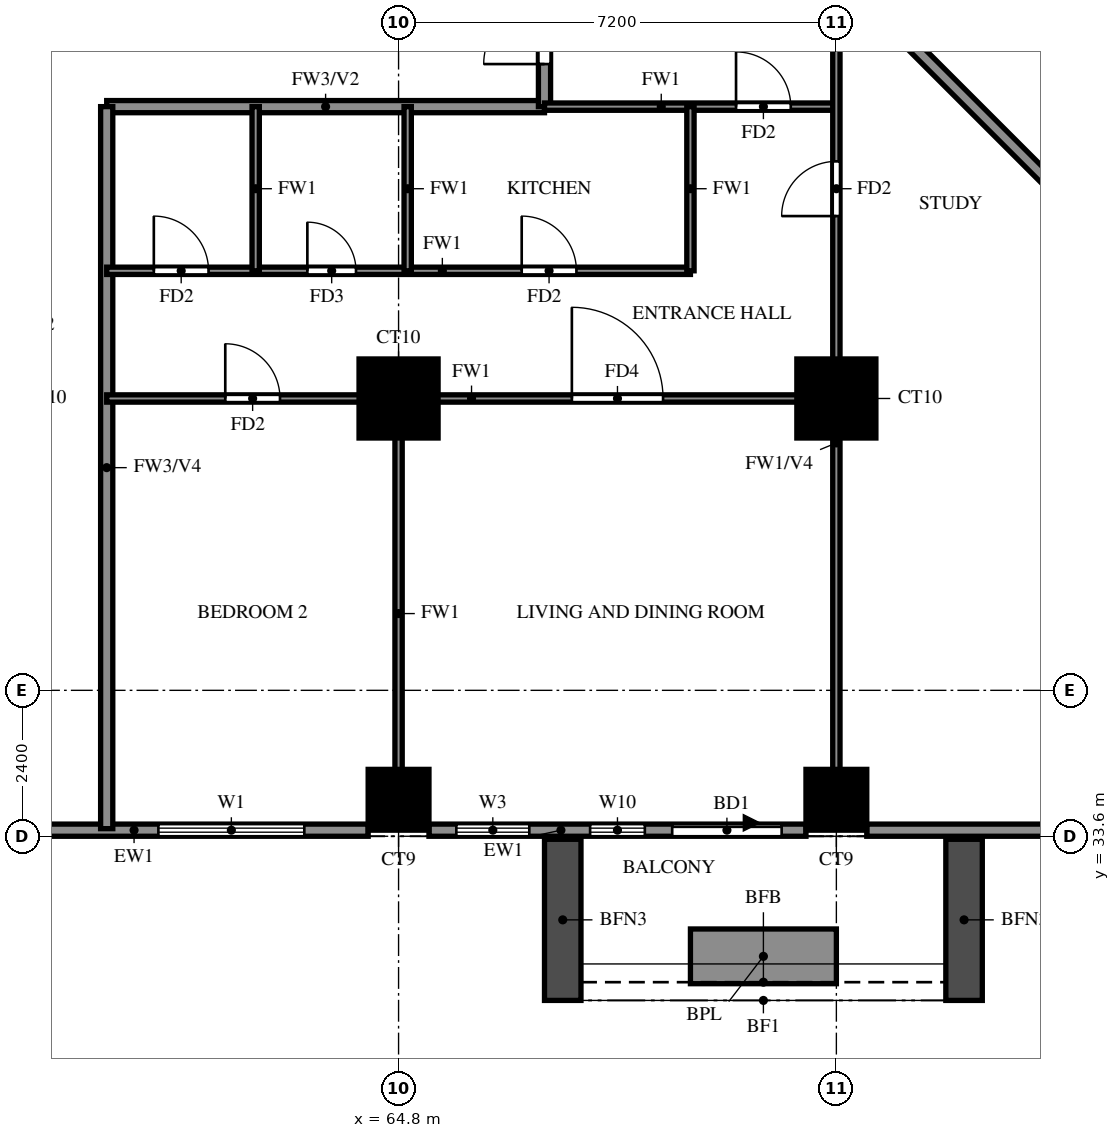
"""IFC4 building model, lengths in metres.
Left out: names, types, materials, properties, quantities, classifications, styles, units other than length and angle.
Written with IfcOpenShell. Run it as: python <this file> out.ifc"""

import sys

from ifc_helpers import new_model, si_unit, direction, frame, frame_2d, origin, origin_2d, place, context, subcontext, project, spatial, rectangle, extrude, source, transform, mapped, element, fill, save


model = new_model("IFC4")
c1 = context("Model", 3, precision=1e-05, world=origin(), true_north=direction((0.0, 1.0)))
c2 = subcontext(c1, "Body", "Model", "MODEL_VIEW")
j1 = project(units=[si_unit("LENGTHUNIT", "METRE"), si_unit("PLANEANGLEUNIT", "RADIAN")], contexts=[c1])
p1 = place(None, origin())
s1 = spatial("IfcSite", under=j1, at=p1, CompositionType="ELEMENT")
p2 = place(p1, origin())
s2 = spatial("IfcBuilding", under=s1, at=p2, CompositionType="ELEMENT")
p3 = place(p2, frame((0.0, 0.0, 69.0)))
s3 = spatial("IfcBuildingStorey", under=s2, at=p3, CompositionType="ELEMENT", Elevation=69.0)
m1 = source(origin(), c2, "Body", "SweptSolid", [
    extrude(rectangle(XDim=1.0, YDim=1.0, at=origin_2d()), origin(), (0.0, 0.0, 1.0), 3.18),
])
for number, where, z_axis, x_axis in (
    (1, (64.8, 34.2, 0.0), (0.0, 0.0, 1.0), (1.0, 0.0, 0.0)),
    (2, (72.0, 34.2, 0.0), (0.0, 0.0, 1.0), (1.0, 0.0, 0.0)),
):
    element("IfcColumn", number, at=place(p3, frame(where, z_axis=z_axis, x_axis=x_axis)), inside=s3, PredefinedType="COLUMN", context=c2, shape_type="MappedRepresentation", body=[
        mapped(m1, transform((0.0, 0.0, 0.0))),
    ])
m2 = source(origin(), c2, "Body", "SweptSolid", [
    extrude(rectangle(XDim=1.3, YDim=1.3, at=origin_2d()), origin(), (0.0, 0.0, 1.0), 3.18),
])
for number, where, z_axis, x_axis in (
    (3, (64.8, 40.8, 0.0), (0.0, 0.0, 1.0), (1.0, 0.0, 0.0)),
    (4, (72.0, 40.8, 0.0), (0.0, 0.0, 1.0), (1.0, 0.0, 0.0)),
):
    element("IfcColumn", number, at=place(p3, frame(where, z_axis=z_axis, x_axis=x_axis)), inside=s3, PredefinedType="COLUMN", context=c2, shape_type="MappedRepresentation", body=[
        mapped(m2, transform((0.0, 0.0, 0.0))),
    ])
p4 = place(p3, frame((85.996, 33.863, 0.0), z_axis=(0.0, 0.0, 1.0), x_axis=(-0.707100718496, 0.707112843825, 0.0)))
e5 = element("IfcWall", 5, at=p4, inside=s3, PredefinedType="SOLIDWALL", context=c2, shape_type="SweptSolid", body=[
    extrude(rectangle(XDim=20.135, YDim=0.2, at=frame_2d((10.067, 0.0))), origin(), (0.0, 0.0, 1.0), 3.18),
])
p5 = place(p3, frame((58.8, 33.7, 0.0), z_axis=(0.0, 0.0, 1.0), x_axis=(1.0, 0.0, 0.0)))
e6 = element("IfcWall", 6, at=p5, inside=s3, PredefinedType="SOLIDWALL", context=c2, shape_type="SweptSolid", body=[
    extrude(rectangle(XDim=5.5, YDim=0.2, at=frame_2d((2.75, 0.0))), origin(), (0.0, 0.0, 1.0), 3.18),
])
p6 = place(p5, frame((2.05, 0.0, 0.6)))
e7 = element("IfcOpeningElement", 7, at=p6, cuts=e6, PredefinedType="OPENING", context=c2, shape_type="SweptSolid", body=[
    extrude(rectangle(XDim=2.4, YDim=2.4, at=frame_2d((1.2, 1.2))), frame((0.0, 0.11, 0.0), z_axis=(0.0, -1.0, 0.0), x_axis=(1.0, 0.0, 0.0)), (0.0, 0.0, 1.0), 0.22),
])
p7 = place(p3, frame((65.3, 33.7, 0.0), z_axis=(0.0, 0.0, 1.0), x_axis=(1.0, 0.0, 0.0)))
e8 = element("IfcWall", 8, at=p7, inside=s3, PredefinedType="SOLIDWALL", context=c2, shape_type="SweptSolid", body=[
    extrude(rectangle(XDim=6.2, YDim=0.2, at=frame_2d((3.1, 0.0))), origin(), (0.0, 0.0, 1.0), 3.18),
])
p8 = place(p7, frame((4.0, 0.0, 0.0)))
e9 = element("IfcOpeningElement", 9, at=p8, cuts=e8, PredefinedType="OPENING", context=c2, shape_type="SweptSolid", body=[
    extrude(rectangle(XDim=1.8, YDim=2.4, at=frame_2d((0.9, 1.2))), frame((0.0, 0.11, 0.0), z_axis=(0.0, -1.0, 0.0), x_axis=(1.0, 0.0, 0.0)), (0.0, 0.0, 1.0), 0.22),
])
p9 = place(p7, frame((0.45, 0.0, 0.6)))
e10 = element("IfcOpeningElement", 10, at=p9, cuts=e8, PredefinedType="OPENING", context=c2, shape_type="SweptSolid", body=[
    extrude(rectangle(XDim=1.2, YDim=2.4, at=frame_2d((0.6, 1.2))), frame((0.0, 0.11, 0.0), z_axis=(0.0, -1.0, 0.0), x_axis=(1.0, 0.0, 0.0)), (0.0, 0.0, 1.0), 0.22),
])
p10 = place(p7, frame((2.65, 0.0, 0.6)))
e11 = element("IfcOpeningElement", 11, at=p10, cuts=e8, PredefinedType="OPENING", context=c2, shape_type="SweptSolid", body=[
    extrude(rectangle(XDim=0.9, YDim=2.4, at=frame_2d((0.45, 1.2))), frame((0.0, 0.11, 0.0), z_axis=(0.0, -1.0, 0.0), x_axis=(1.0, 0.0, 0.0)), (0.0, 0.0, 1.0), 0.22),
])
p11 = place(p3, frame((72.5, 33.7, 0.0), z_axis=(0.0, 0.0, 1.0), x_axis=(1.0, 0.0, 0.0)))
e12 = element("IfcWall", 12, at=p11, inside=s3, PredefinedType="SOLIDWALL", context=c2, shape_type="SweptSolid", body=[
    extrude(rectangle(XDim=13.659, YDim=0.2, at=frame_2d((6.829, 0.0))), origin(), (0.0, 0.0, 1.0), 3.18),
])
p12 = place(p11, frame((3.1, 0.0, 0.6)))
e13 = element("IfcOpeningElement", 13, at=p12, cuts=e12, PredefinedType="OPENING", context=c2, shape_type="SweptSolid", body=[
    extrude(rectangle(XDim=2.4, YDim=2.4, at=frame_2d((1.2, 1.2))), frame((0.0, 0.11, 0.0), z_axis=(0.0, -1.0, 0.0), x_axis=(1.0, 0.0, 0.0)), (0.0, 0.0, 1.0), 0.22),
])
p13 = place(p11, frame((7.386, 0.0, 0.6)))
e14 = element("IfcOpeningElement", 14, at=p13, cuts=e12, PredefinedType="OPENING", context=c2, shape_type="SweptSolid", body=[
    extrude(rectangle(XDim=2.4, YDim=2.4, at=frame_2d((1.2, 1.2))), frame((0.0, 0.11, 0.0), z_axis=(0.0, -1.0, 0.0), x_axis=(1.0, 0.0, 0.0)), (0.0, 0.0, 1.0), 0.22),
])
p14 = place(p11, frame((10.372, 0.0, 0.6)))
e15 = element("IfcOpeningElement", 15, at=p14, cuts=e12, PredefinedType="OPENING", context=c2, shape_type="SweptSolid", body=[
    extrude(rectangle(XDim=2.4, YDim=2.4, at=frame_2d((1.2, 1.2))), frame((0.0, 0.11, 0.0), z_axis=(0.0, -1.0, 0.0), x_axis=(1.0, 0.0, 0.0)), (0.0, 0.0, 1.0), 0.22),
])
for number, where, z_axis, x_axis in (
    (16, (67.5, 33.55, 0.0), (0.0, 0.0, 1.0), (0.0, -1.0, 0.0)),
    (17, (74.1, 33.55, 0.0), (0.0, 0.0, 1.0), (0.0, -1.0, 0.0)),
):
    element("IfcWall", number, at=place(p3, frame(where, z_axis=z_axis, x_axis=x_axis)), inside=s3, PredefinedType="SOLIDWALL", context=c2, shape_type="SweptSolid", body=[
        extrude(rectangle(XDim=2.65, YDim=0.6, at=frame_2d((1.325, 0.0))), origin(), (0.0, 0.0, 1.0), 2.85),
    ])
p15 = place(p3, frame((69.6, 31.625, 0.0), z_axis=(0.0, 0.0, 1.0), x_axis=(1.0, 0.0, 0.0)))
e18 = element("IfcWall", 18, at=p15, inside=s3, PredefinedType="SOLIDWALL", context=c2, shape_type="SweptSolid", body=[
    extrude(rectangle(XDim=2.4, YDim=0.9, at=frame_2d((1.2, 0.0))), origin(), (0.0, 0.0, 1.0), 0.9),
])
p16 = place(p3, frame((60.0, 45.6, 0.0), z_axis=(0.0, 0.0, 1.0), x_axis=(1.0, 0.0, 0.0)))
e19 = element("IfcWall", 19, at=p16, inside=s3, PredefinedType="SOLIDWALL", context=c2, shape_type="SweptSolid", body=[
    extrude(rectangle(XDim=7.2, YDim=0.2, at=frame_2d((3.6, 0.0))), origin(), (0.0, 0.0, 1.0), 3.18),
])
p17 = place(p3, frame((60.0, 33.725, 0.0), z_axis=(0.0, 0.0, 1.0), x_axis=(0.0, 1.0, 0.0)))
e20 = element("IfcWall", 20, at=p17, inside=s3, PredefinedType="SOLIDWALL", context=c2, shape_type="SweptSolid", body=[
    extrude(rectangle(XDim=11.875, YDim=0.2, at=frame_2d((5.938, 0.0))), origin(), (0.0, 0.0, 1.0), 2.28),
])
p18 = place(p3, frame((67.2, 45.6, 0.0), z_axis=(0.0, 0.0, 1.0), x_axis=(0.0, 1.0, 0.0)))
e21 = element("IfcWall", 21, at=p18, inside=s3, PredefinedType="SOLIDWALL", context=c2, shape_type="SweptSolid", body=[
    extrude(rectangle(XDim=12.0, YDim=0.2, at=frame_2d((6.0, 0.0))), origin(), (0.0, 0.0, 1.0), 3.18),
])
p19 = place(p18, frame((10.3, 0.0, 0.0)))
e22 = element("IfcOpeningElement", 22, at=p19, cuts=e21, PredefinedType="OPENING", context=c2, shape_type="SweptSolid", body=[
    extrude(rectangle(XDim=1.0, YDim=2.1, at=frame_2d((0.5, 1.05))), frame((0.0, 0.11, 0.0), z_axis=(0.0, -1.0, 0.0), x_axis=(1.0, 0.0, 0.0)), (0.0, 0.0, 1.0), 0.22),
])
p20 = place(p18, frame((0.7, 0.0, 0.0)))
e23 = element("IfcOpeningElement", 23, at=p20, cuts=e21, PredefinedType="OPENING", context=c2, shape_type="SweptSolid", body=[
    extrude(rectangle(XDim=1.0, YDim=2.1, at=frame_2d((0.5, 1.05))), frame((0.0, 0.11, 0.0), z_axis=(0.0, -1.0, 0.0), x_axis=(1.0, 0.0, 0.0)), (0.0, 0.0, 1.0), 0.22),
])
p21 = place(p3, frame((60.0, 40.8, 0.0), z_axis=(0.0, 0.0, 1.0), x_axis=(1.0, 0.0, 0.0)))
e24 = element("IfcWall", 24, at=p21, inside=s3, PredefinedType="PARTITIONING", context=c2, shape_type="SweptSolid", body=[
    extrude(rectangle(XDim=12.0, YDim=0.12, at=frame_2d((6.0, 0.0))), origin(), (0.0, 0.0, 1.0), 3.18),
])
p22 = place(p21, frame((7.65, 0.0, 0.0)))
e25 = element("IfcOpeningElement", 25, at=p22, cuts=e24, PredefinedType="OPENING", context=c2, shape_type="SweptSolid", body=[
    extrude(rectangle(XDim=1.5, YDim=2.1, at=frame_2d((0.75, 1.05))), frame((0.0, 0.07, 0.0), z_axis=(0.0, -1.0, 0.0), x_axis=(1.0, 0.0, 0.0)), (0.0, 0.0, 1.0), 0.14),
])
p23 = place(p21, frame((1.95, 0.0, 0.0)))
e26 = element("IfcOpeningElement", 26, at=p23, cuts=e24, PredefinedType="OPENING", context=c2, shape_type="SweptSolid", body=[
    extrude(rectangle(XDim=0.9, YDim=2.1, at=frame_2d((0.45, 1.05))), frame((0.0, 0.07, 0.0), z_axis=(0.0, -1.0, 0.0), x_axis=(1.0, 0.0, 0.0)), (0.0, 0.0, 1.0), 0.14),
])
p24 = place(p3, frame((60.0, 42.9, 0.0), z_axis=(0.0, 0.0, 1.0), x_axis=(1.0, 0.0, 0.0)))
e27 = element("IfcWall", 27, at=p24, inside=s3, PredefinedType="PARTITIONING", context=c2, shape_type="SweptSolid", body=[
    extrude(rectangle(XDim=9.6, YDim=0.12, at=frame_2d((4.8, 0.0))), origin(), (0.0, 0.0, 1.0), 3.18),
])
p25 = place(p24, frame((6.825, 0.0, 0.0)))
e28 = element("IfcOpeningElement", 28, at=p25, cuts=e27, PredefinedType="OPENING", context=c2, shape_type="SweptSolid", body=[
    extrude(rectangle(XDim=0.9, YDim=2.1, at=frame_2d((0.45, 1.05))), frame((0.0, 0.07, 0.0), z_axis=(0.0, -1.0, 0.0), x_axis=(1.0, 0.0, 0.0)), (0.0, 0.0, 1.0), 0.14),
])
p26 = place(p24, frame((3.3, 0.0, 0.0)))
e29 = element("IfcOpeningElement", 29, at=p26, cuts=e27, PredefinedType="OPENING", context=c2, shape_type="SweptSolid", body=[
    extrude(rectangle(XDim=0.8, YDim=2.1, at=frame_2d((0.4, 1.05))), frame((0.0, 0.07, 0.0), z_axis=(0.0, -1.0, 0.0), x_axis=(1.0, 0.0, 0.0)), (0.0, 0.0, 1.0), 0.14),
])
p27 = place(p24, frame((0.775, 0.0, 0.0)))
e30 = element("IfcOpeningElement", 30, at=p27, cuts=e27, PredefinedType="OPENING", context=c2, shape_type="SweptSolid", body=[
    extrude(rectangle(XDim=0.9, YDim=2.1, at=frame_2d((0.45, 1.05))), frame((0.0, 0.07, 0.0), z_axis=(0.0, -1.0, 0.0), x_axis=(1.0, 0.0, 0.0)), (0.0, 0.0, 1.0), 0.14),
])
p28 = place(p3, frame((67.2, 45.6, 0.0), z_axis=(0.0, 0.0, 1.0), x_axis=(1.0, 0.0, 0.0)))
e31 = element("IfcWall", 31, at=p28, inside=s3, PredefinedType="PARTITIONING", context=c2, shape_type="SweptSolid", body=[
    extrude(rectangle(XDim=4.8, YDim=0.12, at=frame_2d((2.4, 0.0))), origin(), (0.0, 0.0, 1.0), 3.18),
])
p29 = place(p28, frame((3.15, 0.0, 0.0)))
e32 = element("IfcOpeningElement", 32, at=p29, cuts=e31, PredefinedType="OPENING", context=c2, shape_type="SweptSolid", body=[
    extrude(rectangle(XDim=0.9, YDim=2.1, at=frame_2d((0.45, 1.05))), frame((0.0, 0.07, 0.0), z_axis=(0.0, -1.0, 0.0), x_axis=(1.0, 0.0, 0.0)), (0.0, 0.0, 1.0), 0.14),
])
p30 = place(p3, frame((62.45, 42.9, 0.0), z_axis=(0.0, 0.0, 1.0), x_axis=(0.0, 1.0, 0.0)))
e33 = element("IfcWall", 33, at=p30, inside=s3, PredefinedType="PARTITIONING", context=c2, shape_type="SweptSolid", body=[
    extrude(rectangle(XDim=2.7, YDim=0.12, at=frame_2d((1.35, 0.0))), origin(), (0.0, 0.0, 1.0), 3.18),
])
p31 = place(p3, frame((64.8, 33.725, 0.0), z_axis=(0.0, 0.0, 1.0), x_axis=(0.0, 1.0, 0.0)))
e34 = element("IfcWall", 34, at=p31, inside=s3, PredefinedType="PARTITIONING", context=c2, shape_type="SweptSolid", body=[
    extrude(rectangle(XDim=7.075, YDim=0.12, at=frame_2d((3.538, 0.0))), origin(), (0.0, 0.0, 1.0), 3.18),
])
for number, where, z_axis, x_axis in (
    (35, (64.95, 42.9, 0.0), (0.0, 0.0, 1.0), (0.0, 1.0, 0.0)),
    (36, (69.6, 42.9, 0.0), (0.0, 0.0, 1.0), (0.0, 1.0, 0.0)),
):
    element("IfcWall", number, at=place(p3, frame(where, z_axis=z_axis, x_axis=x_axis)), inside=s3, PredefinedType="PARTITIONING", context=c2, shape_type="SweptSolid", body=[
        extrude(rectangle(XDim=2.7, YDim=0.12, at=frame_2d((1.35, 0.0))), origin(), (0.0, 0.0, 1.0), 3.18),
    ])
p32 = place(p3, frame((72.0, 33.725, 0.0), z_axis=(0.0, 0.0, 1.0), x_axis=(0.0, 1.0, 0.0)))
e37 = element("IfcWall", 37, at=p32, inside=s3, PredefinedType="PARTITIONING", context=c2, shape_type="SweptSolid", body=[
    extrude(rectangle(XDim=14.098, YDim=0.12, at=frame_2d((7.049, 0.0))), origin(), (0.0, 0.0, 1.0), 2.28),
])
p33 = place(p32, frame((10.075, 0.0, 0.0)))
e38 = element("IfcOpeningElement", 38, at=p33, cuts=e37, PredefinedType="OPENING", context=c2, shape_type="SweptSolid", body=[
    extrude(rectangle(XDim=0.9, YDim=2.1, at=frame_2d((0.45, 1.05))), frame((0.0, 0.07, 0.0), z_axis=(0.0, -1.0, 0.0), x_axis=(1.0, 0.0, 0.0)), (0.0, 0.0, 1.0), 0.14),
])
p34 = place(p6, origin())
e39 = element("IfcWindow", 39, at=p34, inside=s3, PartitioningType="DOUBLE_PANEL_VERTICAL", PredefinedType="WINDOW", context=c2, shape_type="SweptSolid", body=[
    extrude(rectangle(XDim=2.4, YDim=2.4, at=frame_2d((1.2, 1.2))), frame((0.0, 0.03, 0.0), z_axis=(0.0, -1.0, 0.0), x_axis=(1.0, 0.0, 0.0)), (0.0, 0.0, 1.0), 0.06),
])
fill(e7, e39)
p35 = place(p8, origin())
e40 = element("IfcDoor", 40, at=p35, inside=s3, OperationType="DOUBLE_DOOR_SLIDING", PredefinedType="DOOR", context=c2, shape_type="SweptSolid", body=[
    extrude(rectangle(XDim=1.8, YDim=2.4, at=frame_2d((0.9, 1.2))), frame((0.0, 0.025, 0.0), z_axis=(0.0, -1.0, 0.0), x_axis=(1.0, 0.0, 0.0)), (0.0, 0.0, 1.0), 0.05),
])
fill(e9, e40)
p36 = place(p9, origin())
e41 = element("IfcWindow", 41, at=p36, inside=s3, PartitioningType="SINGLE_PANEL", PredefinedType="WINDOW", context=c2, shape_type="SweptSolid", body=[
    extrude(rectangle(XDim=1.2, YDim=2.4, at=frame_2d((0.6, 1.2))), frame((0.0, 0.03, 0.0), z_axis=(0.0, -1.0, 0.0), x_axis=(1.0, 0.0, 0.0)), (0.0, 0.0, 1.0), 0.06),
])
fill(e10, e41)
p37 = place(p10, origin())
e42 = element("IfcWindow", 42, at=p37, inside=s3, PartitioningType="SINGLE_PANEL", PredefinedType="WINDOW", context=c2, shape_type="SweptSolid", body=[
    extrude(rectangle(XDim=0.9, YDim=2.4, at=frame_2d((0.45, 1.2))), frame((0.0, 0.03, 0.0), z_axis=(0.0, -1.0, 0.0), x_axis=(1.0, 0.0, 0.0)), (0.0, 0.0, 1.0), 0.06),
])
fill(e11, e42)
p38 = place(p29, origin())
e43 = element("IfcDoor", 43, at=p38, inside=s3, OperationType="SINGLE_SWING_RIGHT", PredefinedType="DOOR", context=c2, shape_type="SweptSolid", body=[
    extrude(rectangle(XDim=0.9, YDim=2.1, at=frame_2d((0.45, 1.05))), frame((0.0, 0.025, 0.0), z_axis=(0.0, -1.0, 0.0), x_axis=(1.0, 0.0, 0.0)), (0.0, 0.0, 1.0), 0.05),
])
fill(e32, e43)
p39 = place(p20, origin())
e44 = element("IfcDoor", 44, at=p39, inside=s3, OperationType="SINGLE_SWING_LEFT", PredefinedType="DOOR", context=c2, shape_type="SweptSolid", body=[
    extrude(rectangle(XDim=1.0, YDim=2.1, at=frame_2d((0.5, 1.05))), frame((0.0, 0.025, 0.0), z_axis=(0.0, -1.0, 0.0), x_axis=(1.0, 0.0, 0.0)), (0.0, 0.0, 1.0), 0.05),
])
fill(e23, e44)
p40 = place(p22, origin())
e45 = element("IfcDoor", 45, at=p40, inside=s3, OperationType="SINGLE_SWING_LEFT", PredefinedType="DOOR", context=c2, shape_type="SweptSolid", body=[
    extrude(rectangle(XDim=1.5, YDim=2.1, at=frame_2d((0.75, 1.05))), frame((0.0, 0.025, 0.0), z_axis=(0.0, -1.0, 0.0), x_axis=(1.0, 0.0, 0.0)), (0.0, 0.0, 1.0), 0.05),
])
fill(e25, e45)
p41 = place(p23, origin())
e46 = element("IfcDoor", 46, at=p41, inside=s3, OperationType="SINGLE_SWING_RIGHT", PredefinedType="DOOR", context=c2, shape_type="SweptSolid", body=[
    extrude(rectangle(XDim=0.9, YDim=2.1, at=frame_2d((0.45, 1.05))), frame((0.0, 0.025, 0.0), z_axis=(0.0, -1.0, 0.0), x_axis=(1.0, 0.0, 0.0)), (0.0, 0.0, 1.0), 0.05),
])
fill(e26, e46)
p42 = place(p25, origin())
e47 = element("IfcDoor", 47, at=p42, inside=s3, OperationType="SINGLE_SWING_LEFT", PredefinedType="DOOR", context=c2, shape_type="SweptSolid", body=[
    extrude(rectangle(XDim=0.9, YDim=2.1, at=frame_2d((0.45, 1.05))), frame((0.0, 0.025, 0.0), z_axis=(0.0, -1.0, 0.0), x_axis=(1.0, 0.0, 0.0)), (0.0, 0.0, 1.0), 0.05),
])
fill(e28, e47)
p43 = place(p26, origin())
e48 = element("IfcDoor", 48, at=p43, inside=s3, OperationType="SINGLE_SWING_LEFT", PredefinedType="DOOR", context=c2, shape_type="SweptSolid", body=[
    extrude(rectangle(XDim=0.8, YDim=2.1, at=frame_2d((0.4, 1.05))), frame((0.0, 0.025, 0.0), z_axis=(0.0, -1.0, 0.0), x_axis=(1.0, 0.0, 0.0)), (0.0, 0.0, 1.0), 0.05),
])
fill(e29, e48)
p44 = place(p27, origin())
e49 = element("IfcDoor", 49, at=p44, inside=s3, OperationType="SINGLE_SWING_RIGHT", PredefinedType="DOOR", context=c2, shape_type="SweptSolid", body=[
    extrude(rectangle(XDim=0.9, YDim=2.1, at=frame_2d((0.45, 1.05))), frame((0.0, 0.025, 0.0), z_axis=(0.0, -1.0, 0.0), x_axis=(1.0, 0.0, 0.0)), (0.0, 0.0, 1.0), 0.05),
])
fill(e30, e49)
p45 = place(p33, origin())
e50 = element("IfcDoor", 50, at=p45, inside=s3, OperationType="SINGLE_SWING_LEFT", PredefinedType="DOOR", context=c2, shape_type="SweptSolid", body=[
    extrude(rectangle(XDim=0.9, YDim=2.1, at=frame_2d((0.45, 1.05))), frame((0.0, 0.025, 0.0), z_axis=(0.0, -1.0, 0.0), x_axis=(1.0, 0.0, 0.0)), (0.0, 0.0, 1.0), 0.05),
])
fill(e38, e50)
save(model, sys.argv[1])
